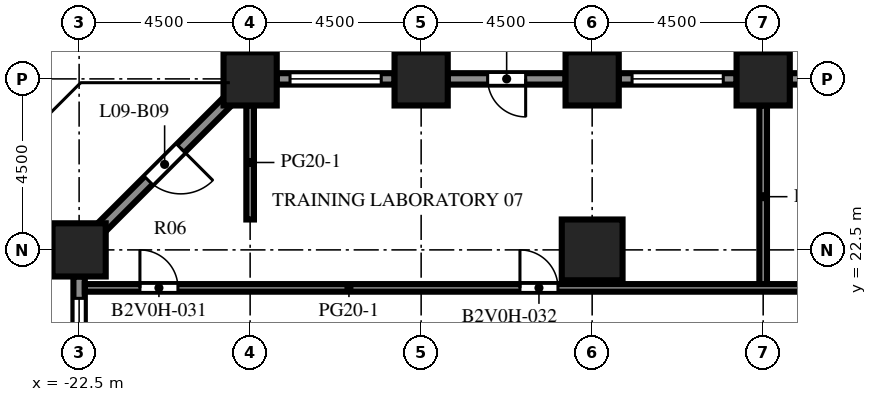
"""IFC4 building model, lengths in metres.
Left out: names, types, materials, properties, quantities, classifications, styles, units other than length and angle.
Written with IfcOpenShell. Run it as: python <this file> out.ifc"""

import sys

from ifc_helpers import new_model, si_unit, direction, frame, frame_2d, origin, origin_2d, place, context, subcontext, project, spatial, rectangle, extrude, element, fill, save


model = new_model("IFC4")
c1 = context("Model", 3, precision=1e-05, world=origin(), true_north=direction((0.0, 1.0)))
c2 = subcontext(c1, "Body", "Model", "MODEL_VIEW")
j1 = project(units=[si_unit("LENGTHUNIT", "METRE"), si_unit("PLANEANGLEUNIT", "RADIAN")], contexts=[c1])
p1 = place(None, origin())
s1 = spatial("IfcSite", under=j1, at=p1, CompositionType="ELEMENT")
p2 = place(p1, origin())
s2 = spatial("IfcBuilding", under=s1, at=p2, CompositionType="ELEMENT")
p3 = place(p2, frame((0.0, 0.0, 41.9)))
s3 = spatial("IfcBuildingStorey", under=s2, at=p3, CompositionType="ELEMENT", Elevation=41.9)
p4 = place(p3, frame((-22.5, 22.5, -0.45), z_axis=(0.0, 0.0, 1.0), x_axis=(1.0, 0.0, 0.0)))
e1 = element("IfcColumn", 1, at=p4, inside=s3, PredefinedType="COLUMN", context=c2, shape_type="SweptSolid", body=[
    extrude(rectangle(XDim=1.4, YDim=1.4, at=origin_2d()), origin(), (0.0, 0.0, 1.0), 4.55),
])
for number, where, z_axis, x_axis in (
    (2, (-18.0, 27.0, 0.0), (0.0, 0.0, 1.0), (1.0, 0.0, 0.0)),
    (3, (-13.5, 27.0, 0.0), (0.0, 0.0, 1.0), (1.0, 0.0, 0.0)),
    (4, (-9.0, 27.0, 0.0), (0.0, 0.0, 1.0), (1.0, 0.0, 0.0)),
    (5, (-4.5, 27.0, 0.0), (0.0, 0.0, 1.0), (1.0, 0.0, 0.0)),
):
    element("IfcColumn", number, at=place(p3, frame(where, z_axis=z_axis, x_axis=x_axis)), inside=s3, PredefinedType="COLUMN", context=c2, shape_type="SweptSolid", body=[
        extrude(rectangle(XDim=1.4, YDim=1.4, at=origin_2d()), origin(), (0.0, 0.0, 1.0), 4.1),
    ])
p5 = place(p3, frame((-9.0, 22.5, 0.0), z_axis=(0.0, 0.0, 1.0), x_axis=(1.0, 0.0, 0.0)))
e6 = element("IfcColumn", 6, at=p5, inside=s3, PredefinedType="COLUMN", context=c2, shape_type="SweptSolid", body=[
    extrude(rectangle(XDim=1.6, YDim=1.6, at=origin_2d()), origin(), (0.0, 0.0, 1.0), 4.1),
])
p6 = place(p3, frame((-3.8, 27.0, 0.0), z_axis=(0.0, 0.0, 1.0), x_axis=(1.0, 0.0, 0.0)))
e7 = element("IfcWall", 7, at=p6, inside=s3, PredefinedType="SOLIDWALL", context=c2, shape_type="SweptSolid", body=[
    extrude(rectangle(XDim=3.1, YDim=0.3, at=frame_2d((1.55, 0.0))), origin(), (0.0, 0.0, 1.0), 2.75),
])
p7 = place(p6, frame((0.35, 0.0, 0.8)))
e8 = element("IfcOpeningElement", 8, at=p7, cuts=e7, PredefinedType="OPENING", context=c2, shape_type="SweptSolid", body=[
    extrude(rectangle(XDim=2.4, YDim=1.7, at=frame_2d((1.2, 0.85))), frame((0.0, 0.16, 0.0), z_axis=(0.0, -1.0, 0.0), x_axis=(1.0, 0.0, 0.0)), (0.0, 0.0, 1.0), 0.32),
])
p8 = place(p3, frame((-8.3, 27.0, 0.0), z_axis=(0.0, 0.0, 1.0), x_axis=(1.0, 0.0, 0.0)))
e9 = element("IfcWall", 9, at=p8, inside=s3, PredefinedType="SOLIDWALL", context=c2, shape_type="SweptSolid", body=[
    extrude(rectangle(XDim=3.1, YDim=0.3, at=frame_2d((1.55, 0.0))), origin(), (0.0, 0.0, 1.0), 2.75),
])
p9 = place(p8, frame((0.35, 0.0, 0.8)))
e10 = element("IfcOpeningElement", 10, at=p9, cuts=e9, PredefinedType="OPENING", context=c2, shape_type="SweptSolid", body=[
    extrude(rectangle(XDim=2.4, YDim=1.7, at=frame_2d((1.2, 0.85))), frame((0.0, 0.16, 0.0), z_axis=(0.0, -1.0, 0.0), x_axis=(1.0, 0.0, 0.0)), (0.0, 0.0, 1.0), 0.32),
])
p10 = place(p3, frame((-12.8, 27.0, 0.0), z_axis=(0.0, 0.0, 1.0), x_axis=(1.0, 0.0, 0.0)))
e11 = element("IfcWall", 11, at=p10, inside=s3, PredefinedType="SOLIDWALL", context=c2, shape_type="SweptSolid", body=[
    extrude(rectangle(XDim=3.1, YDim=0.3, at=frame_2d((1.55, 0.0))), origin(), (0.0, 0.0, 1.0), 2.75),
])
p11 = place(p10, frame((1.05, 0.0, 0.0)))
e12 = element("IfcOpeningElement", 12, at=p11, cuts=e11, PredefinedType="OPENING", context=c2, shape_type="SweptSolid", body=[
    extrude(rectangle(XDim=1.0, YDim=2.2, at=frame_2d((0.5, 1.1))), frame((0.0, 0.16, 0.0), z_axis=(0.0, -1.0, 0.0), x_axis=(1.0, 0.0, 0.0)), (0.0, 0.0, 1.0), 0.32),
])
p12 = place(p3, frame((-17.3, 27.0, 0.0), z_axis=(0.0, 0.0, 1.0), x_axis=(1.0, 0.0, 0.0)))
e13 = element("IfcWall", 13, at=p12, inside=s3, PredefinedType="SOLIDWALL", context=c2, shape_type="SweptSolid", body=[
    extrude(rectangle(XDim=3.1, YDim=0.3, at=frame_2d((1.55, 0.0))), origin(), (0.0, 0.0, 1.0), 2.75),
])
p13 = place(p12, frame((0.35, 0.0, 0.8)))
e14 = element("IfcOpeningElement", 14, at=p13, cuts=e13, PredefinedType="OPENING", context=c2, shape_type="SweptSolid", body=[
    extrude(rectangle(XDim=2.4, YDim=1.7, at=frame_2d((1.2, 0.85))), frame((0.0, 0.16, 0.0), z_axis=(0.0, -1.0, 0.0), x_axis=(1.0, 0.0, 0.0)), (0.0, 0.0, 1.0), 0.32),
])
p14 = place(p3, frame((-21.906, 23.094, 0.0), z_axis=(0.0, 0.0, 1.0), x_axis=(0.707106781187, 0.707106781187, 0.0)))
e15 = element("IfcWall", 15, at=p14, inside=s3, PredefinedType="SOLIDWALL", context=c2, shape_type="SweptSolid", body=[
    extrude(rectangle(XDim=4.684, YDim=0.3, at=frame_2d((2.342, 0.0))), origin(), (0.0, 0.0, 1.0), 2.75),
])
p15 = place(p14, frame((1.742, 0.0, 0.0)))
e16 = element("IfcOpeningElement", 16, at=p15, cuts=e15, PredefinedType="OPENING", context=c2, shape_type="SweptSolid", body=[
    extrude(rectangle(XDim=1.2, YDim=2.2, at=frame_2d((0.6, 1.1))), frame((0.0, 0.16, 0.0), z_axis=(0.0, -1.0, 0.0), x_axis=(1.0, 0.0, 0.0)), (0.0, 0.0, 1.0), 0.32),
])
p16 = place(p3, frame((-22.5, 18.7, 0.0), z_axis=(0.0, 0.0, 1.0), x_axis=(0.0, 1.0, 0.0)))
e17 = element("IfcWall", 17, at=p16, inside=s3, PredefinedType="SOLIDWALL", context=c2, shape_type="SweptSolid", body=[
    extrude(rectangle(XDim=3.1, YDim=0.3, at=frame_2d((1.55, 0.0))), origin(), (0.0, 0.0, 1.0), 2.75),
])
p17 = place(p16, frame((0.125, 0.0, 0.8)))
e18 = element("IfcOpeningElement", 18, at=p17, cuts=e17, PredefinedType="OPENING", context=c2, shape_type="SweptSolid", body=[
    extrude(rectangle(XDim=2.4, YDim=1.7, at=frame_2d((1.2, 0.85))), frame((0.0, 0.16, 0.0), z_axis=(0.0, -1.0, 0.0), x_axis=(1.0, 0.0, 0.0)), (0.0, 0.0, 1.0), 0.32),
])
p18 = place(p3, frame((-18.0, 23.3, 0.0), z_axis=(0.0, 0.0, 1.0), x_axis=(0.0, 1.0, 0.0)))
e19 = element("IfcWall", 19, at=p18, inside=s3, PredefinedType="PARTITIONING", context=c2, shape_type="SweptSolid", body=[
    extrude(rectangle(XDim=3.0, YDim=0.2, at=frame_2d((1.5, 0.0))), origin(), (0.0, 0.0, 1.0), 3.65),
])
p19 = place(p3, frame((-4.5, 21.5, 0.0), z_axis=(0.0, 0.0, 1.0), x_axis=(0.0, 1.0, 0.0)))
e20 = element("IfcWall", 20, at=p19, inside=s3, PredefinedType="PARTITIONING", context=c2, shape_type="SweptSolid", body=[
    extrude(rectangle(XDim=4.8, YDim=0.2, at=frame_2d((2.4, 0.0))), origin(), (0.0, 0.0, 1.0), 3.65),
])
p20 = place(p3, frame((-22.35, 21.5, 0.0), z_axis=(0.0, 0.0, 1.0), x_axis=(1.0, 0.0, 0.0)))
e21 = element("IfcWall", 21, at=p20, inside=s3, PredefinedType="PARTITIONING", context=c2, shape_type="SweptSolid", body=[
    extrude(rectangle(XDim=53.7, YDim=0.2, at=frame_2d((26.85, 0.0))), origin(), (0.0, 0.0, 1.0), 3.65),
])
p21 = place(p20, frame((1.45, 0.0, 0.0)))
e22 = element("IfcOpeningElement", 22, at=p21, cuts=e21, PredefinedType="OPENING", context=c2, shape_type="SweptSolid", body=[
    extrude(rectangle(XDim=1.0, YDim=2.1, at=frame_2d((0.5, 1.05))), frame((0.0, 0.11, 0.0), z_axis=(0.0, -1.0, 0.0), x_axis=(1.0, 0.0, 0.0)), (0.0, 0.0, 1.0), 0.22),
])
p22 = place(p20, frame((11.45, 0.0, 0.0)))
e23 = element("IfcOpeningElement", 23, at=p22, cuts=e21, PredefinedType="OPENING", context=c2, shape_type="SweptSolid", body=[
    extrude(rectangle(XDim=1.0, YDim=2.1, at=frame_2d((0.5, 1.05))), frame((0.0, 0.11, 0.0), z_axis=(0.0, -1.0, 0.0), x_axis=(1.0, 0.0, 0.0)), (0.0, 0.0, 1.0), 0.22),
])
p23 = place(p20, frame((19.95, 0.0, 0.0)))
e24 = element("IfcOpeningElement", 24, at=p23, cuts=e21, PredefinedType="OPENING", context=c2, shape_type="SweptSolid", body=[
    extrude(rectangle(XDim=1.0, YDim=2.1, at=frame_2d((0.5, 1.05))), frame((0.0, 0.11, 0.0), z_axis=(0.0, -1.0, 0.0), x_axis=(1.0, 0.0, 0.0)), (0.0, 0.0, 1.0), 0.22),
])
p24 = place(p20, frame((25.7, 0.0, 0.0)))
e25 = element("IfcOpeningElement", 25, at=p24, cuts=e21, PredefinedType="OPENING", context=c2, shape_type="SweptSolid", body=[
    extrude(rectangle(XDim=1.0, YDim=2.1, at=frame_2d((0.5, 1.05))), frame((0.0, 0.11, 0.0), z_axis=(0.0, -1.0, 0.0), x_axis=(1.0, 0.0, 0.0)), (0.0, 0.0, 1.0), 0.22),
])
p25 = place(p20, frame((32.7, 0.0, 0.0)))
e26 = element("IfcOpeningElement", 26, at=p25, cuts=e21, PredefinedType="OPENING", context=c2, shape_type="SweptSolid", body=[
    extrude(rectangle(XDim=1.0, YDim=2.1, at=frame_2d((0.5, 1.05))), frame((0.0, 0.11, 0.0), z_axis=(0.0, -1.0, 0.0), x_axis=(1.0, 0.0, 0.0)), (0.0, 0.0, 1.0), 0.22),
])
p26 = place(p20, frame((37.45, 0.0, 0.0)))
e27 = element("IfcOpeningElement", 27, at=p26, cuts=e21, PredefinedType="OPENING", context=c2, shape_type="SweptSolid", body=[
    extrude(rectangle(XDim=1.0, YDim=2.1, at=frame_2d((0.5, 1.05))), frame((0.0, 0.11, 0.0), z_axis=(0.0, -1.0, 0.0), x_axis=(1.0, 0.0, 0.0)), (0.0, 0.0, 1.0), 0.22),
])
p27 = place(p20, frame((42.45, 0.0, 0.0)))
e28 = element("IfcOpeningElement", 28, at=p27, cuts=e21, PredefinedType="OPENING", context=c2, shape_type="SweptSolid", body=[
    extrude(rectangle(XDim=1.0, YDim=2.1, at=frame_2d((0.5, 1.05))), frame((0.0, 0.11, 0.0), z_axis=(0.0, -1.0, 0.0), x_axis=(1.0, 0.0, 0.0)), (0.0, 0.0, 1.0), 0.22),
])
p28 = place(p20, frame((50.2, 0.0, 0.0)))
e29 = element("IfcOpeningElement", 29, at=p28, cuts=e21, PredefinedType="OPENING", context=c2, shape_type="SweptSolid", body=[
    extrude(rectangle(XDim=1.0, YDim=2.1, at=frame_2d((0.5, 1.05))), frame((0.0, 0.11, 0.0), z_axis=(0.0, -1.0, 0.0), x_axis=(1.0, 0.0, 0.0)), (0.0, 0.0, 1.0), 0.22),
])
p29 = place(p9, origin())
e30 = element("IfcWindow", 30, at=p29, inside=s3, PartitioningType="SINGLE_PANEL", PredefinedType="WINDOW", context=c2, shape_type="SweptSolid", body=[
    extrude(rectangle(XDim=2.4, YDim=1.7, at=frame_2d((1.2, 0.85))), frame((0.0, 0.03, 0.0), z_axis=(0.0, -1.0, 0.0), x_axis=(1.0, 0.0, 0.0)), (0.0, 0.0, 1.0), 0.06),
])
fill(e10, e30)
p30 = place(p11, origin())
e31 = element("IfcDoor", 31, at=p30, inside=s3, OperationType="SINGLE_SWING_RIGHT", PredefinedType="DOOR", context=c2, shape_type="SweptSolid", body=[
    extrude(rectangle(XDim=1.0, YDim=2.2, at=frame_2d((0.5, 1.1))), frame((0.0, 0.025, 0.0), z_axis=(0.0, -1.0, 0.0), x_axis=(1.0, 0.0, 0.0)), (0.0, 0.0, 1.0), 0.05),
])
fill(e12, e31)
p31 = place(p13, origin())
e32 = element("IfcWindow", 32, at=p31, inside=s3, PartitioningType="SINGLE_PANEL", PredefinedType="WINDOW", context=c2, shape_type="SweptSolid", body=[
    extrude(rectangle(XDim=2.4, YDim=1.7, at=frame_2d((1.2, 0.85))), frame((0.0, 0.03, 0.0), z_axis=(0.0, -1.0, 0.0), x_axis=(1.0, 0.0, 0.0)), (0.0, 0.0, 1.0), 0.06),
])
fill(e14, e32)
p32 = place(p15, origin())
e33 = element("IfcDoor", 33, at=p32, inside=s3, OperationType="SINGLE_SWING_RIGHT", PredefinedType="DOOR", context=c2, shape_type="SweptSolid", body=[
    extrude(rectangle(XDim=1.2, YDim=2.2, at=frame_2d((0.6, 1.1))), frame((0.0, 0.025, 0.0), z_axis=(0.0, -1.0, 0.0), x_axis=(1.0, 0.0, 0.0)), (0.0, 0.0, 1.0), 0.05),
])
fill(e16, e33)
p33 = place(p17, origin())
e34 = element("IfcWindow", 34, at=p33, inside=s3, PartitioningType="SINGLE_PANEL", PredefinedType="WINDOW", context=c2, shape_type="SweptSolid", body=[
    extrude(rectangle(XDim=2.4, YDim=1.7, at=frame_2d((1.2, 0.85))), frame((0.0, 0.03, 0.0), z_axis=(0.0, -1.0, 0.0), x_axis=(1.0, 0.0, 0.0)), (0.0, 0.0, 1.0), 0.06),
])
fill(e18, e34)
p34 = place(p21, origin())
e35 = element("IfcDoor", 35, at=p34, inside=s3, OperationType="SINGLE_SWING_LEFT", PredefinedType="DOOR", context=c2, shape_type="SweptSolid", body=[
    extrude(rectangle(XDim=1.0, YDim=2.1, at=frame_2d((0.5, 1.05))), frame((0.0, 0.025, 0.0), z_axis=(0.0, -1.0, 0.0), x_axis=(1.0, 0.0, 0.0)), (0.0, 0.0, 1.0), 0.05),
])
fill(e22, e35)
p35 = place(p22, origin())
e36 = element("IfcDoor", 36, at=p35, inside=s3, OperationType="SINGLE_SWING_LEFT", PredefinedType="DOOR", context=c2, shape_type="SweptSolid", body=[
    extrude(rectangle(XDim=1.0, YDim=2.1, at=frame_2d((0.5, 1.05))), frame((0.0, 0.025, 0.0), z_axis=(0.0, -1.0, 0.0), x_axis=(1.0, 0.0, 0.0)), (0.0, 0.0, 1.0), 0.05),
])
fill(e23, e36)
save(model, sys.argv[1])
